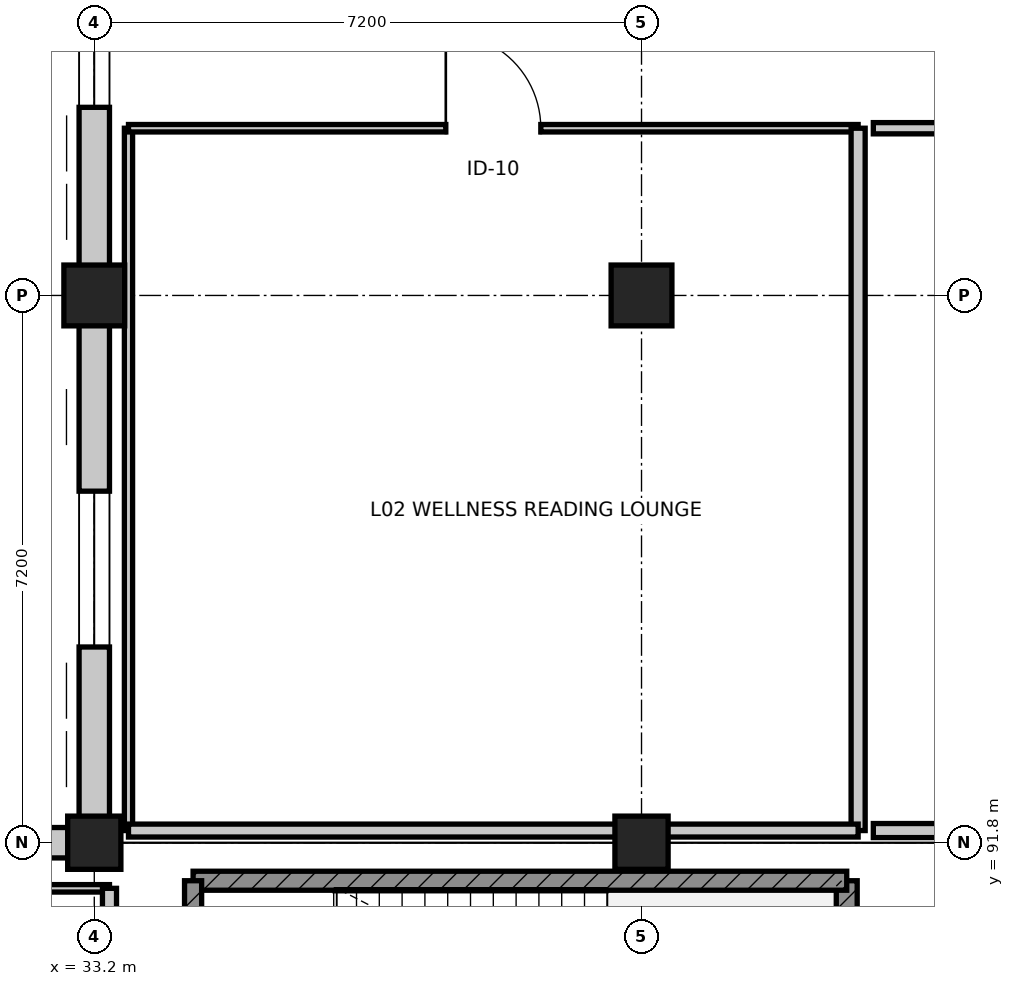
"""IFC4 building model, lengths in metres.
Left out: names, types, materials, properties, quantities, classifications, styles, units other than length and angle.
Written with IfcOpenShell. Run it as: python <this file> out.ifc"""

import sys

from ifc_helpers import new_model, si_unit, direction, frame, frame_2d, origin, origin_2d, place, context, subcontext, project, spatial, rectangle, extrude, element, fill, save


model = new_model("IFC4")
c1 = context("Model", 3, precision=1e-05, world=origin(), true_north=direction((0.0, 1.0)))
c2 = subcontext(c1, "Body", "Model", "MODEL_VIEW")
j1 = project(units=[si_unit("LENGTHUNIT", "METRE"), si_unit("PLANEANGLEUNIT", "RADIAN")], contexts=[c1])
p1 = place(None, origin())
s1 = spatial("IfcSite", under=j1, at=p1, CompositionType="ELEMENT")
p2 = place(p1, origin())
s2 = spatial("IfcBuilding", under=s1, at=p2, CompositionType="ELEMENT")
p3 = place(p2, frame((0.0, 0.0, 10.5)))
s3 = spatial("IfcBuildingStorey", under=s2, at=p3, CompositionType="ELEMENT", Elevation=10.5)
p4 = place(p3, frame((33.2, 91.8, 0.0), z_axis=(0.0, 0.0, 1.0), x_axis=(1.0, 0.0, 0.0)))
e1 = element("IfcColumn", 1, at=p4, inside=s3, PredefinedType="COLUMN", context=c2, shape_type="SweptSolid", body=[
    extrude(rectangle(XDim=0.7, YDim=0.7, at=origin_2d()), origin(), (0.0, 0.0, 1.0), 4.5),
])
p5 = place(p3, frame((33.2, 99.0, 0.0), z_axis=(0.0, 0.0, 1.0), x_axis=(1.0, 0.0, 0.0)))
e2 = element("IfcColumn", 2, at=p5, inside=s3, PredefinedType="COLUMN", context=c2, shape_type="SweptSolid", body=[
    extrude(rectangle(XDim=0.8, YDim=0.8, at=origin_2d()), origin(), (0.0, 0.0, 1.0), 4.5),
])
p6 = place(p3, frame((40.4, 91.8, 0.0), z_axis=(0.0, 0.0, 1.0), x_axis=(1.0, 0.0, 0.0)))
e3 = element("IfcColumn", 3, at=p6, inside=s3, PredefinedType="COLUMN", context=c2, shape_type="SweptSolid", body=[
    extrude(rectangle(XDim=0.7, YDim=0.7, at=origin_2d()), origin(), (0.0, 0.0, 1.0), 4.5),
])
p7 = place(p3, frame((40.4, 99.0, 0.0), z_axis=(0.0, 0.0, 1.0), x_axis=(1.0, 0.0, 0.0)))
e4 = element("IfcColumn", 4, at=p7, inside=s3, PredefinedType="COLUMN", context=c2, shape_type="SweptSolid", body=[
    extrude(rectangle(XDim=0.8, YDim=0.8, at=origin_2d()), origin(), (0.0, 0.0, 1.0), 4.5),
])
p8 = place(p3, frame((26.0, 91.8, 0.0), z_axis=(0.0, 0.0, 1.0), x_axis=(1.0, 0.0, 0.0)))
e5 = element("IfcWall", 5, at=p8, inside=s3, PredefinedType="STANDARD", context=c2, shape_type="SweptSolid", body=[
    extrude(rectangle(XDim=7.2, YDim=0.4, at=frame_2d((3.6, 0.0))), origin(), (0.0, 0.0, 1.0), 3.555),
])
p9 = place(p8, frame((2.65, 0.0, 0.9)))
e6 = element("IfcOpeningElement", 6, at=p9, cuts=e5, PredefinedType="OPENING", context=c2, shape_type="SweptSolid", body=[
    extrude(rectangle(XDim=1.9, YDim=1.85, at=frame_2d((0.95, 0.925))), frame((0.0, 0.21, 0.0), z_axis=(0.0, -1.0, 0.0), x_axis=(1.0, 0.0, 0.0)), (0.0, 0.0, 1.0), 0.42),
])
p10 = place(p8, frame((4.95, 0.0, 0.85)))
e7 = element("IfcOpeningElement", 7, at=p10, cuts=e5, PredefinedType="OPENING", context=c2, shape_type="SweptSolid", body=[
    extrude(rectangle(XDim=1.2, YDim=1.8, at=frame_2d((0.6, 0.9))), frame((0.0, 0.21, 0.0), z_axis=(0.0, -1.0, 0.0), x_axis=(1.0, 0.0, 0.0)), (0.0, 0.0, 1.0), 0.42),
])
p11 = place(p3, frame((33.2, 91.8, 0.0), z_axis=(0.0, 0.0, 1.0), x_axis=(0.0, 1.0, 0.0)))
e8 = element("IfcWall", 8, at=p11, inside=s3, PredefinedType="STANDARD", context=c2, shape_type="SweptSolid", body=[
    extrude(rectangle(XDim=7.2, YDim=0.4, at=frame_2d((3.6, 0.0))), origin(), (0.0, 0.0, 1.0), 3.555),
])
p12 = place(p11, frame((2.575, 0.0, 0.9)))
e9 = element("IfcOpeningElement", 9, at=p12, cuts=e8, PredefinedType="OPENING", context=c2, shape_type="SweptSolid", body=[
    extrude(rectangle(XDim=2.05, YDim=1.85, at=frame_2d((1.025, 0.925))), frame((0.0, 0.21, 0.0), z_axis=(0.0, -1.0, 0.0), x_axis=(1.0, 0.0, 0.0)), (0.0, 0.0, 1.0), 0.42),
])
p13 = place(p3, frame((33.2, 99.0, 0.0), z_axis=(0.0, 0.0, 1.0), x_axis=(0.0, 1.0, 0.0)))
e10 = element("IfcWall", 10, at=p13, inside=s3, PredefinedType="STANDARD", context=c2, shape_type="SweptSolid", body=[
    extrude(rectangle(XDim=7.2, YDim=0.4, at=frame_2d((3.6, 0.0))), origin(), (0.0, 0.0, 1.0), 3.555),
])
p14 = place(p13, frame((2.475, 0.0, 0.9)))
e11 = element("IfcOpeningElement", 11, at=p14, cuts=e10, PredefinedType="OPENING", context=c2, shape_type="SweptSolid", body=[
    extrude(rectangle(XDim=2.25, YDim=1.85, at=frame_2d((1.125, 0.925))), frame((0.0, 0.21, 0.0), z_axis=(0.0, -1.0, 0.0), x_axis=(1.0, 0.0, 0.0)), (0.0, 0.0, 1.0), 0.42),
])
p15 = place(p3, frame((43.1, 87.7, 0.0), z_axis=(0.0, 0.0, 1.0), x_axis=(0.0, 1.0, 0.0)))
e12 = element("IfcWall", 12, at=p15, inside=s3, PredefinedType="SHEAR", context=c2, shape_type="SweptSolid", body=[
    extrude(rectangle(XDim=3.6, YDim=0.275, at=frame_2d((1.8, 0.0))), origin(), (0.0, 0.0, 1.0), 4.22),
])
p16 = place(p3, frame((43.1, 91.3, 0.0), z_axis=(0.0, 0.0, 1.0), x_axis=(-1.0, 0.0, 0.0)))
e13 = element("IfcWall", 13, at=p16, inside=s3, PredefinedType="SHEAR", context=c2, shape_type="SweptSolid", body=[
    extrude(rectangle(XDim=8.6, YDim=0.25, at=frame_2d((4.3, 0.0))), origin(), (0.0, 0.0, 1.0), 4.22),
])
p17 = place(p3, frame((34.5, 91.3, 0.0), z_axis=(0.0, 0.0, 1.0), x_axis=(0.0, -1.0, 0.0)))
e14 = element("IfcWall", 14, at=p17, inside=s3, PredefinedType="SHEAR", context=c2, shape_type="SweptSolid", body=[
    extrude(rectangle(XDim=3.6, YDim=0.225, at=frame_2d((1.8, 0.0))), origin(), (0.0, 0.0, 1.0), 4.22),
])
p18 = place(p3, frame((33.65, 91.96, 0.0), z_axis=(0.0, 0.0, 1.0), x_axis=(0.0, 1.0, 0.0)))
e15 = element("IfcWall", 15, at=p18, inside=s3, PredefinedType="PARTITIONING", context=c2, shape_type="SweptSolid", body=[
    extrude(rectangle(XDim=9.24, YDim=0.108, at=frame_2d((4.62, 0.0))), origin(), (0.0, 0.0, 1.0), 3.455),
])
p19 = place(p3, frame((33.65, 101.2, 0.0), z_axis=(0.0, 0.0, 1.0), x_axis=(1.0, 0.0, 0.0)))
e16 = element("IfcWall", 16, at=p19, inside=s3, PredefinedType="PARTITIONING", context=c2, shape_type="SweptSolid", body=[
    extrude(rectangle(XDim=9.6, YDim=0.098, at=frame_2d((4.8, 0.0))), origin(), (0.0, 0.0, 1.0), 3.555),
])
p20 = place(p19, frame((4.175, 0.0, 0.0)))
e17 = element("IfcOpeningElement", 17, at=p20, cuts=e16, PredefinedType="OPENING", context=c2, shape_type="SweptSolid", body=[
    extrude(rectangle(XDim=1.25, YDim=2.2, at=frame_2d((0.625, 1.1))), frame((0.0, 0.059, 0.0), z_axis=(0.0, -1.0, 0.0), x_axis=(1.0, 0.0, 0.0)), (0.0, 0.0, 1.0), 0.118),
])
p21 = place(p3, frame((43.25, 101.2, 0.0), z_axis=(0.0, 0.0, 1.0), x_axis=(0.0, -1.0, 0.0)))
e18 = element("IfcWall", 18, at=p21, inside=s3, PredefinedType="PARTITIONING", context=c2, shape_type="SweptSolid", body=[
    extrude(rectangle(XDim=9.24, YDim=0.185, at=frame_2d((4.62, 0.0))), origin(), (0.0, 0.0, 1.0), 3.455),
])
p22 = place(p3, frame((43.25, 91.96, 0.0), z_axis=(0.0, 0.0, 1.0), x_axis=(-1.0, 0.0, 0.0)))
e19 = element("IfcWall", 19, at=p22, inside=s3, PredefinedType="PARTITIONING", context=c2, shape_type="SweptSolid", body=[
    extrude(rectangle(XDim=9.6, YDim=0.17, at=frame_2d((4.8, 0.0))), origin(), (0.0, 0.0, 1.0), 3.455),
])
p23 = place(p3, frame((43.45, 101.2, 0.0), z_axis=(0.0, 0.0, 1.0), x_axis=(1.0, 0.0, 0.0)))
e20 = element("IfcWall", 20, at=p23, inside=s3, PredefinedType="PARTITIONING", context=c2, shape_type="SweptSolid", body=[
    extrude(rectangle(XDim=25.55, YDim=0.148, at=frame_2d((12.775, 0.0))), origin(), (0.0, 0.0, 1.0), 3.555),
])
p24 = place(p23, frame((12.27, 0.0, 0.0)))
e21 = element("IfcOpeningElement", 21, at=p24, cuts=e20, PredefinedType="OPENING", context=c2, shape_type="SweptSolid", body=[
    extrude(rectangle(XDim=1.01, YDim=2.16, at=frame_2d((0.505, 1.08))), frame((0.0, 0.084, 0.0), z_axis=(0.0, -1.0, 0.0), x_axis=(1.0, 0.0, 0.0)), (0.0, 0.0, 1.0), 0.168),
])
p25 = place(p3, frame((68.59, 91.96, 0.0), z_axis=(0.0, 0.0, 1.0), x_axis=(-1.0, 0.0, 0.0)))
e22 = element("IfcWall", 22, at=p25, inside=s3, PredefinedType="PARTITIONING", context=c2, shape_type="SweptSolid", body=[
    extrude(rectangle(XDim=25.14, YDim=0.185, at=frame_2d((12.57, 0.0))), origin(), (0.0, 0.0, 1.0), 3.455),
])
p26 = place(p3, frame((12.2, 91.2, 0.0), z_axis=(0.0, 0.0, 1.0), x_axis=(1.0, 0.0, 0.0)))
e23 = element("IfcWall", 23, at=p26, inside=s3, PredefinedType="PARTITIONING", context=c2, shape_type="SweptSolid", body=[
    extrude(rectangle(XDim=21.2, YDim=0.098, at=frame_2d((10.6, 0.0))), origin(), (0.0, 0.0, 1.0), 3.796),
])
p27 = place(p3, frame((33.4, 91.2, 0.0), z_axis=(0.0, 0.0, 1.0), x_axis=(0.0, -1.0, 0.0)))
e24 = element("IfcWall", 24, at=p27, inside=s3, PredefinedType="PARTITIONING", context=c2, shape_type="SweptSolid", body=[
    extrude(rectangle(XDim=16.8, YDim=0.185, at=frame_2d((8.4, 0.0))), origin(), (0.0, 0.0, 1.0), 3.555),
])
p28 = place(p27, frame((8.25, 0.0, 0.0)))
e25 = element("IfcOpeningElement", 25, at=p28, cuts=e24, PredefinedType="OPENING", context=c2, shape_type="SweptSolid", body=[
    extrude(rectangle(XDim=1.8, YDim=2.2, at=frame_2d((0.9, 1.1))), frame((0.0, 0.103, 0.0), z_axis=(0.0, -1.0, 0.0), x_axis=(1.0, 0.0, 0.0)), (0.0, 0.0, 1.0), 0.205),
])
p29 = place(p12, origin())
e26 = element("IfcWindow", 26, at=p29, inside=s3, PartitioningType="SINGLE_PANEL", PredefinedType="WINDOW", context=c2, shape_type="SweptSolid", body=[
    extrude(rectangle(XDim=2.05, YDim=1.85, at=frame_2d((1.025, 0.925))), frame((0.0, 0.03, 0.0), z_axis=(0.0, -1.0, 0.0), x_axis=(1.0, 0.0, 0.0)), (0.0, 0.0, 1.0), 0.06),
])
fill(e9, e26)
p30 = place(p14, origin())
e27 = element("IfcWindow", 27, at=p30, inside=s3, PartitioningType="SINGLE_PANEL", PredefinedType="WINDOW", context=c2, shape_type="SweptSolid", body=[
    extrude(rectangle(XDim=2.25, YDim=1.85, at=frame_2d((1.125, 0.925))), frame((0.0, 0.03, 0.0), z_axis=(0.0, -1.0, 0.0), x_axis=(1.0, 0.0, 0.0)), (0.0, 0.0, 1.0), 0.06),
])
fill(e11, e27)
p31 = place(p20, origin())
e28 = element("IfcDoor", 28, at=p31, inside=s3, OperationType="SINGLE_SWING_LEFT", PredefinedType="DOOR", context=c2, shape_type="SweptSolid", body=[
    extrude(rectangle(XDim=1.25, YDim=2.2, at=frame_2d((0.625, 1.1))), frame((0.0, 0.025, 0.0), z_axis=(0.0, -1.0, 0.0), x_axis=(1.0, 0.0, 0.0)), (0.0, 0.0, 1.0), 0.05),
])
fill(e17, e28)
save(model, sys.argv[1])
